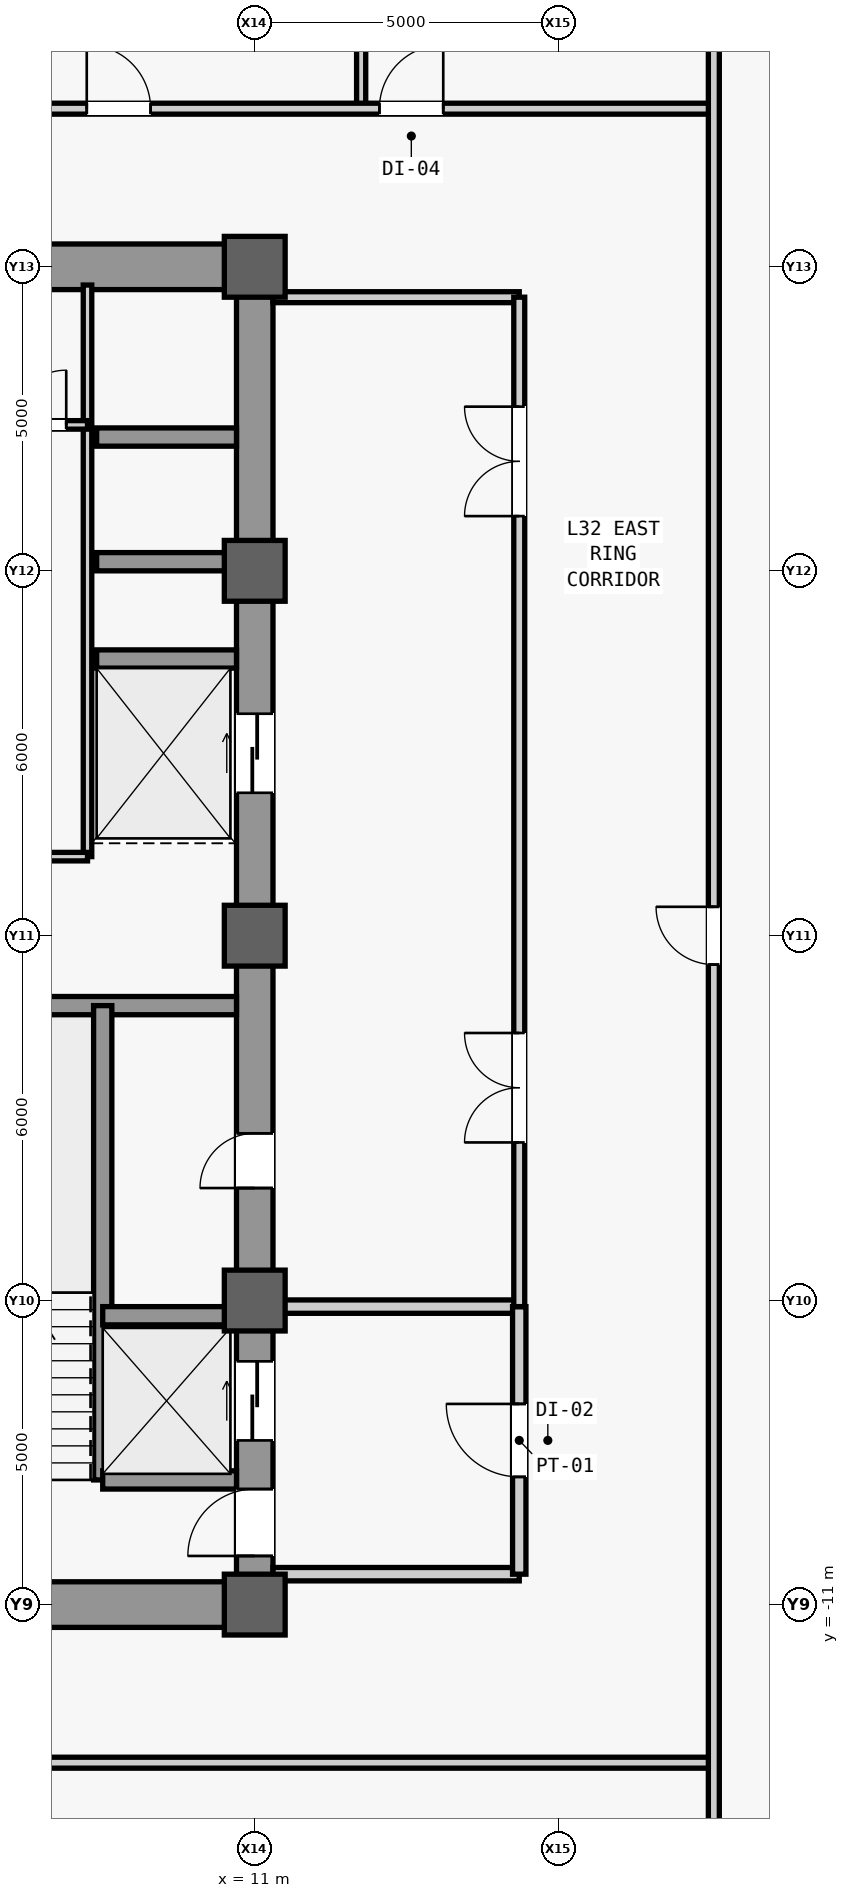
"""IFC4 building model, lengths in metres.
Left out: names, types, materials, properties, quantities, classifications, styles, units other than length and angle.
Written with IfcOpenShell. Run it as: python <this file> out.ifc"""

import sys

from ifc_helpers import new_model, si_unit, direction, frame, frame_2d, origin, origin_2d, place, context, subcontext, project, spatial, rectangle, extrude, source, transform, mapped, element, fill, save


model = new_model("IFC4")
c1 = context("Model", 3, precision=1e-05, world=origin(), true_north=direction((0.0, 1.0)))
c2 = subcontext(c1, "Body", "Model", "MODEL_VIEW")
j1 = project(units=[si_unit("LENGTHUNIT", "METRE"), si_unit("PLANEANGLEUNIT", "RADIAN")], contexts=[c1])
p1 = place(None, origin())
s1 = spatial("IfcSite", under=j1, at=p1, CompositionType="ELEMENT")
p2 = place(p1, origin())
s2 = spatial("IfcBuilding", under=s1, at=p2, CompositionType="ELEMENT")
p3 = place(p2, frame((0.0, 0.0, 140.6)))
s3 = spatial("IfcBuildingStorey", under=s2, at=p3, CompositionType="ELEMENT", Elevation=140.6)
m1 = source(origin(), c2, "Body", "SweptSolid", [
    extrude(rectangle(XDim=22.0, YDim=0.6, at=frame_2d((11.0, 0.0))), origin(), (0.0, 0.0, 1.0), 3.84),
])
p4 = place(p3, frame((11.0, -11.0, 0.0), z_axis=(0.0, 0.0, 1.0), x_axis=(0.0, 1.0, 0.0)))
e1 = element("IfcWall", 1, at=p4, inside=s3, PredefinedType="SHEAR", context=c2, shape_type="MappedRepresentation", body=[
    mapped(m1, transform((0.0, 0.0, 0.0), scale=1.0)),
])
m2 = source(origin(), c2, "Body", "SweptSolid", [
    extrude(rectangle(XDim=1.1, YDim=2.2, at=frame_2d((0.55, 1.1))), frame((0.0, 0.31, 0.0), z_axis=(0.0, -1.0, 0.0), x_axis=(1.0, 0.0, 0.0)), (0.0, 0.0, 1.0), 0.62),
])
p5 = place(p4, frame((0.8, 0.0, 0.0)))
e2 = element("IfcOpeningElement", 2, at=p5, cuts=e1, PredefinedType="OPENING", context=c2, shape_type="MappedRepresentation", body=[
    mapped(m2, transform((0.0, 0.0, 0.0), scale=1.0)),
])
m3 = source(origin(), c2, "Body", "SweptSolid", [
    extrude(rectangle(XDim=0.9, YDim=2.15, at=frame_2d((0.45, 1.075))), frame((0.0, 0.31, 0.0), z_axis=(0.0, -1.0, 0.0), x_axis=(1.0, 0.0, 0.0)), (0.0, 0.0, 1.0), 0.62),
])
p6 = place(p4, frame((6.85, 0.0, 0.0)))
e3 = element("IfcOpeningElement", 3, at=p6, cuts=e1, PredefinedType="OPENING", context=c2, shape_type="MappedRepresentation", body=[
    mapped(m3, transform((0.0, 0.0, 0.0), scale=1.0)),
])
m4 = source(origin(), c2, "Body", "SweptSolid", [
    extrude(rectangle(XDim=1.3, YDim=2.3, at=frame_2d((0.65, 1.15))), frame((0.0, 0.31, 0.0), z_axis=(0.0, -1.0, 0.0), x_axis=(1.0, 0.0, 0.0)), (0.0, 0.0, 1.0), 0.62),
])
p7 = place(p4, frame((2.7, 0.0, 0.0)))
e4 = element("IfcOpeningElement", 4, at=p7, cuts=e1, PredefinedType="OPENING", context=c2, shape_type="MappedRepresentation", body=[
    mapped(m4, transform((0.0, 0.0, 0.0), scale=1.0)),
])
p8 = place(p4, frame((13.35, 0.0, 0.0)))
e5 = element("IfcOpeningElement", 5, at=p8, cuts=e1, PredefinedType="OPENING", context=c2, shape_type="MappedRepresentation", body=[
    mapped(m4, transform((0.0, 0.0, 0.0), scale=1.0)),
])
m5 = source(origin(), c2, "Body", "SweptSolid", [
    extrude(rectangle(XDim=5.85, YDim=0.75, at=frame_2d((2.925, 0.0))), origin(), (0.0, 0.0, 1.0), 3.84),
])
p9 = place(p3, frame((4.85, -11.0, 0.0), z_axis=(0.0, 0.0, 1.0), x_axis=(1.0, 0.0, 0.0)))
e6 = element("IfcWall", 6, at=p9, inside=s3, PredefinedType="SHEAR", context=c2, shape_type="MappedRepresentation", body=[
    mapped(m5, transform((0.0, 0.0, 0.0), scale=1.0)),
])
p10 = place(p3, frame((4.85, 11.0, 0.0), z_axis=(0.0, 0.0, 1.0), x_axis=(1.0, 0.0, 0.0)))
e7 = element("IfcWall", 7, at=p10, inside=s3, PredefinedType="SHEAR", context=c2, shape_type="MappedRepresentation", body=[
    mapped(m5, transform((0.0, 0.0, 0.0), scale=1.0)),
])
m6 = source(origin(), c2, "Body", "SweptSolid", [
    extrude(rectangle(XDim=1.05, YDim=2.2, at=frame_2d((0.525, 1.1))), frame((0.0, 0.385, 0.0), z_axis=(0.0, -1.0, 0.0), x_axis=(1.0, 0.0, 0.0)), (0.0, 0.0, 1.0), 0.77),
])
p11 = place(p10, frame((1.375, 0.0, 0.0)))
e8 = element("IfcOpeningElement", 8, at=p11, cuts=e7, PredefinedType="OPENING", context=c2, shape_type="MappedRepresentation", body=[
    mapped(m6, transform((0.0, 0.0, 0.0), scale=1.0)),
])
m7 = source(origin(), c2, "Body", "SweptSolid", [
    extrude(rectangle(XDim=5.6, YDim=0.3, at=frame_2d((2.8, 0.0))), origin(), (0.0, 0.0, 1.0), 3.84),
])
p12 = place(p3, frame((5.1, -1.15, 0.0), z_axis=(0.0, 0.0, 1.0), x_axis=(1.0, 0.0, 0.0)))
e9 = element("IfcWall", 9, at=p12, inside=s3, PredefinedType="SHEAR", context=c2, shape_type="MappedRepresentation", body=[
    mapped(m7, transform((0.0, 0.0, 0.0), scale=1.0)),
])
m8 = source(origin(), c2, "Body", "SweptSolid", [
    extrude(rectangle(XDim=1.0, YDim=1.0, at=origin_2d()), origin(), (0.0, 0.0, 1.0), 4.1),
])
for number, where, z_axis, x_axis in (
    (10, (11.0, -11.0, 0.0), (0.0, 0.0, 1.0), (1.0, 0.0, 0.0)),
    (11, (11.0, -6.0, 0.0), (0.0, 0.0, 1.0), (1.0, 0.0, 0.0)),
    (12, (11.0, 0.0, 0.0), (0.0, 0.0, 1.0), (1.0, 0.0, 0.0)),
    (13, (11.0, 6.0, 0.0), (0.0, 0.0, 1.0), (1.0, 0.0, 0.0)),
    (14, (11.0, 11.0, 0.0), (0.0, 0.0, 1.0), (1.0, 0.0, 0.0)),
):
    element("IfcColumn", number, at=place(p3, frame(where, z_axis=z_axis, x_axis=x_axis)), inside=s3, PredefinedType="COLUMN", context=c2, shape_type="MappedRepresentation", body=[
        mapped(m8, transform((0.0, 0.0, 0.0), scale=1.0)),
    ])
m9 = source(origin(), c2, "Body", "SweptSolid", [
    extrude(rectangle(XDim=7.8, YDim=0.3, at=frame_2d((3.9, 0.0))), origin(), (0.0, 0.0, 1.0), 3.84),
])
p13 = place(p3, frame((8.5, -8.95, 0.0), z_axis=(0.0, 0.0, 1.0), x_axis=(0.0, 1.0, 0.0)))
e15 = element("IfcWall", 15, at=p13, inside=s3, PredefinedType="SHEAR", context=c2, shape_type="MappedRepresentation", body=[
    mapped(m9, transform((0.0, 0.0, 0.0), scale=1.0)),
])
m10 = source(origin(), c2, "Body", "SweptSolid", [
    extrude(rectangle(XDim=2.2, YDim=0.3, at=frame_2d((1.1, 0.0))), origin(), (0.0, 0.0, 1.0), 3.84),
])
for number, where, z_axis, x_axis in (
    (16, (8.5, -8.95, 0.0), (0.0, 0.0, 1.0), (1.0, 0.0, 0.0)),
    (17, (8.5, -6.25, 0.0), (0.0, 0.0, 1.0), (1.0, 0.0, 0.0)),
):
    element("IfcWall", number, at=place(p3, frame(where, z_axis=z_axis, x_axis=x_axis)), inside=s3, PredefinedType="SHEAR", context=c2, shape_type="MappedRepresentation", body=[
        mapped(m10, transform((0.0, 0.0, 0.0), scale=1.0)),
    ])
m11 = source(origin(), c2, "Body", "SweptSolid", [
    extrude(rectangle(XDim=2.3, YDim=0.3, at=frame_2d((1.15, 0.0))), origin(), (0.0, 0.0, 1.0), 3.84),
])
for number, where, z_axis, x_axis in (
    (18, (8.4, 4.55, 0.0), (0.0, 0.0, 1.0), (1.0, 0.0, 0.0)),
    (19, (8.4, 6.15, 0.0), (0.0, 0.0, 1.0), (1.0, 0.0, 0.0)),
    (20, (8.4, 8.2, 0.0), (0.0, 0.0, 1.0), (1.0, 0.0, 0.0)),
):
    element("IfcWall", number, at=place(p3, frame(where, z_axis=z_axis, x_axis=x_axis)), inside=s3, PredefinedType="SHEAR", context=c2, shape_type="MappedRepresentation", body=[
        mapped(m11, transform((0.0, 0.0, 0.0), scale=1.0)),
    ])
m12 = source(origin(), c2, "Body", "SweptSolid", [
    extrude(rectangle(XDim=9.4, YDim=0.14, at=frame_2d((4.7, 0.0))), origin(), (0.0, 0.0, 1.0), 3.84),
])
p14 = place(p3, frame((8.25, 1.3, 0.0), z_axis=(0.0, 0.0, 1.0), x_axis=(0.0, 1.0, 0.0)))
e21 = element("IfcWall", 21, at=p14, inside=s3, PredefinedType="PARTITIONING", context=c2, shape_type="MappedRepresentation", body=[
    mapped(m12, transform((0.0, 0.0, 0.0), scale=1.0)),
])
m13 = source(origin(), c2, "Body", "SweptSolid", [
    extrude(rectangle(XDim=3.15, YDim=0.14, at=frame_2d((1.575, 0.0))), origin(), (0.0, 0.0, 1.0), 3.84),
])
p15 = place(p3, frame((5.1, 1.3, 0.0), z_axis=(0.0, 0.0, 1.0), x_axis=(1.0, 0.0, 0.0)))
e22 = element("IfcWall", 22, at=p15, inside=s3, PredefinedType="PARTITIONING", context=c2, shape_type="MappedRepresentation", body=[
    mapped(m13, transform((0.0, 0.0, 0.0), scale=1.0)),
])
p16 = place(p3, frame((5.1, 8.4, 0.0), z_axis=(0.0, 0.0, 1.0), x_axis=(1.0, 0.0, 0.0)))
e23 = element("IfcWall", 23, at=p16, inside=s3, PredefinedType="PARTITIONING", context=c2, shape_type="MappedRepresentation", body=[
    mapped(m13, transform((0.0, 0.0, 0.0), scale=1.0)),
])
m14 = source(origin(), c2, "Body", "SweptSolid", [
    extrude(rectangle(XDim=0.9, YDim=2.15, at=frame_2d((0.45, 1.075))), frame((0.0, 0.08, 0.0), z_axis=(0.0, -1.0, 0.0), x_axis=(1.0, 0.0, 0.0)), (0.0, 0.0, 1.0), 0.16),
])
p17 = place(p16, frame((0.33, 0.0, 0.0)))
e24 = element("IfcOpeningElement", 24, at=p17, cuts=e23, PredefinedType="OPENING", context=c2, shape_type="MappedRepresentation", body=[
    mapped(m14, transform((0.0, 0.0, 0.0), scale=1.0)),
])
p18 = place(p16, frame((1.9, 0.0, 0.0)))
e25 = element("IfcOpeningElement", 25, at=p18, cuts=e23, PredefinedType="OPENING", context=c2, shape_type="MappedRepresentation", body=[
    mapped(m14, transform((0.0, 0.0, 0.0), scale=1.0)),
])
m15 = source(origin(), c2, "Body", "SweptSolid", [
    extrude(rectangle(XDim=4.05, YDim=0.22, at=frame_2d((2.025, 0.0))), origin(), (0.0, 0.0, 1.0), 3.84),
])
p19 = place(p3, frame((11.3, -10.5, 0.0), z_axis=(0.0, 0.0, 1.0), x_axis=(1.0, 0.0, 0.0)))
e26 = element("IfcWall", 26, at=p19, inside=s3, PredefinedType="PARTITIONING", context=c2, shape_type="MappedRepresentation", body=[
    mapped(m15, transform((0.0, 0.0, 0.0), scale=1.0)),
])
m16 = source(origin(), c2, "Body", "SweptSolid", [
    extrude(rectangle(XDim=4.05, YDim=0.22, at=frame_2d((2.025, 0.0))), origin(), (0.0, 0.0, 1.0), 3.067),
])
p20 = place(p3, frame((11.3, -6.1, 0.0), z_axis=(0.0, 0.0, 1.0), x_axis=(1.0, 0.0, 0.0)))
e27 = element("IfcWall", 27, at=p20, inside=s3, PredefinedType="PARTITIONING", context=c2, shape_type="MappedRepresentation", body=[
    mapped(m16, transform((0.0, 0.0, 0.0), scale=1.0)),
])
m17 = source(origin(), c2, "Body", "SweptSolid", [
    extrude(rectangle(XDim=4.4, YDim=0.22, at=frame_2d((2.2, 0.0))), origin(), (0.0, 0.0, 1.0), 3.84),
])
p21 = place(p3, frame((15.35, -10.5, 0.0), z_axis=(0.0, 0.0, 1.0), x_axis=(0.0, 1.0, 0.0)))
e28 = element("IfcWall", 28, at=p21, inside=s3, PredefinedType="PARTITIONING", context=c2, shape_type="MappedRepresentation", body=[
    mapped(m17, transform((0.0, 0.0, 0.0), scale=1.0)),
])
m18 = source(origin(), c2, "Body", "SweptSolid", [
    extrude(rectangle(XDim=1.2, YDim=2.2, at=frame_2d((0.6, 1.1))), frame((0.0, 0.12, 0.0), z_axis=(0.0, -1.0, 0.0), x_axis=(1.0, 0.0, 0.0)), (0.0, 0.0, 1.0), 0.24),
])
p22 = place(p21, frame((1.6, 0.0, 0.0)))
e29 = element("IfcOpeningElement", 29, at=p22, cuts=e28, PredefinedType="OPENING", context=c2, shape_type="MappedRepresentation", body=[
    mapped(m18, transform((0.0, 0.0, 0.0), scale=1.0)),
])
m19 = source(origin(), c2, "Body", "SweptSolid", [
    extrude(rectangle(XDim=4.05, YDim=0.18, at=frame_2d((2.025, 0.0))), origin(), (0.0, 0.0, 1.0), 3.84),
])
p23 = place(p3, frame((11.3, 10.5, 0.0), z_axis=(0.0, 0.0, 1.0), x_axis=(1.0, 0.0, 0.0)))
e30 = element("IfcWall", 30, at=p23, inside=s3, PredefinedType="PARTITIONING", context=c2, shape_type="MappedRepresentation", body=[
    mapped(m19, transform((0.0, 0.0, 0.0), scale=1.0)),
])
m20 = source(origin(), c2, "Body", "SweptSolid", [
    extrude(rectangle(XDim=16.6, YDim=0.18, at=frame_2d((8.3, 0.0))), origin(), (0.0, 0.0, 1.0), 3.84),
])
p24 = place(p3, frame((15.35, -6.1, 0.0), z_axis=(0.0, 0.0, 1.0), x_axis=(0.0, 1.0, 0.0)))
e31 = element("IfcWall", 31, at=p24, inside=s3, PredefinedType="PARTITIONING", context=c2, shape_type="MappedRepresentation", body=[
    mapped(m20, transform((0.0, 0.0, 0.0), scale=1.0)),
])
m21 = source(origin(), c2, "Body", "SweptSolid", [
    extrude(rectangle(XDim=1.8, YDim=2.25, at=frame_2d((0.9, 1.125))), frame((0.0, 0.1, 0.0), z_axis=(0.0, -1.0, 0.0), x_axis=(1.0, 0.0, 0.0)), (0.0, 0.0, 1.0), 0.2),
])
p25 = place(p24, frame((2.7, 0.0, 0.0)))
e32 = element("IfcOpeningElement", 32, at=p25, cuts=e31, PredefinedType="OPENING", context=c2, shape_type="MappedRepresentation", body=[
    mapped(m21, transform((0.0, 0.0, 0.0), scale=1.0)),
])
p26 = place(p24, frame((13.0, 0.0, 0.0)))
e33 = element("IfcOpeningElement", 33, at=p26, cuts=e31, PredefinedType="OPENING", context=c2, shape_type="MappedRepresentation", body=[
    mapped(m21, transform((0.0, 0.0, 0.0), scale=1.0)),
])
m22 = source(origin(), c2, "Body", "SweptSolid", [
    extrude(rectangle(XDim=36.25, YDim=0.18, at=frame_2d((18.125, 0.0))), origin(), (0.0, 0.0, 1.0), 3.84),
])
p27 = place(p3, frame((-17.7, -13.6, 0.0), z_axis=(0.0, 0.0, 1.0), x_axis=(1.0, 0.0, 0.0)))
e34 = element("IfcWall", 34, at=p27, inside=s3, PredefinedType="PARTITIONING", context=c2, shape_type="MappedRepresentation", body=[
    mapped(m22, transform((0.0, 0.0, 0.0), scale=1.0)),
])
m23 = source(origin(), c2, "Body", "SweptSolid", [
    extrude(rectangle(XDim=1.05, YDim=2.2, at=frame_2d((0.525, 1.1))), frame((0.0, 0.1, 0.0), z_axis=(0.0, -1.0, 0.0), x_axis=(1.0, 0.0, 0.0)), (0.0, 0.0, 1.0), 0.2),
])
p28 = place(p27, frame((9.1, 0.0, 0.0)))
e35 = element("IfcOpeningElement", 35, at=p28, cuts=e34, PredefinedType="OPENING", context=c2, shape_type="MappedRepresentation", body=[
    mapped(m23, transform((0.0, 0.0, 0.0), scale=1.0)),
])
p29 = place(p27, frame((23.5, 0.0, 0.0)))
e36 = element("IfcOpeningElement", 36, at=p29, cuts=e34, PredefinedType="OPENING", context=c2, shape_type="MappedRepresentation", body=[
    mapped(m23, transform((0.0, 0.0, 0.0), scale=1.0)),
])
m24 = source(origin(), c2, "Body", "SweptSolid", [
    extrude(rectangle(XDim=18.4, YDim=0.15, at=frame_2d((9.2, 0.0))), origin(), (0.0, 0.0, 1.0), 3.84),
])
p30 = place(p3, frame((12.75, 13.6, 0.0), z_axis=(0.0, 0.0, 1.0), x_axis=(0.0, 1.0, 0.0)))
e37 = element("IfcWall", 37, at=p30, inside=s3, PredefinedType="PARTITIONING", context=c2, shape_type="MappedRepresentation", body=[
    mapped(m24, transform((0.0, 0.0, 0.0), scale=1.0)),
])
p31 = place(p3, frame((-17.7, 13.6, 0.0), z_axis=(0.0, 0.0, 1.0), x_axis=(1.0, 0.0, 0.0)))
e38 = element("IfcWall", 38, at=p31, inside=s3, PredefinedType="PARTITIONING", context=c2, shape_type="MappedRepresentation", body=[
    mapped(m22, transform((0.0, 0.0, 0.0), scale=1.0)),
])
p32 = place(p31, frame((4.387, 0.0, 0.0)))
e39 = element("IfcOpeningElement", 39, at=p32, cuts=e38, PredefinedType="OPENING", context=c2, shape_type="MappedRepresentation", body=[
    mapped(m23, transform((0.0, 0.0, 0.0), scale=1.0)),
])
p33 = place(p31, frame((9.625, 0.0, 0.0)))
e40 = element("IfcOpeningElement", 40, at=p33, cuts=e38, PredefinedType="OPENING", context=c2, shape_type="MappedRepresentation", body=[
    mapped(m23, transform((0.0, 0.0, 0.0), scale=1.0)),
])
p34 = place(p31, frame((17.6, 0.0, 0.0)))
e41 = element("IfcOpeningElement", 41, at=p34, cuts=e38, PredefinedType="OPENING", context=c2, shape_type="MappedRepresentation", body=[
    mapped(m23, transform((0.0, 0.0, 0.0), scale=1.0)),
])
p35 = place(p31, frame((25.938, 0.0, 0.0)))
e42 = element("IfcOpeningElement", 42, at=p35, cuts=e38, PredefinedType="OPENING", context=c2, shape_type="MappedRepresentation", body=[
    mapped(m23, transform((0.0, 0.0, 0.0), scale=1.0)),
])
p36 = place(p31, frame((30.75, 0.0, 0.0)))
e43 = element("IfcOpeningElement", 43, at=p36, cuts=e38, PredefinedType="OPENING", context=c2, shape_type="MappedRepresentation", body=[
    mapped(m23, transform((0.0, 0.0, 0.0), scale=1.0)),
])
m25 = source(origin(), c2, "Body", "SweptSolid", [
    extrude(rectangle(XDim=56.0, YDim=0.18, at=frame_2d((28.0, 0.0))), origin(), (0.0, 0.0, 1.0), 3.84),
])
p37 = place(p3, frame((18.55, -28.0, 0.0), z_axis=(0.0, 0.0, 1.0), x_axis=(0.0, 1.0, 0.0)))
e44 = element("IfcWall", 44, at=p37, inside=s3, PredefinedType="PARTITIONING", context=c2, shape_type="MappedRepresentation", body=[
    mapped(m25, transform((0.0, 0.0, 0.0), scale=1.0)),
])
m26 = source(origin(), c2, "Body", "SweptSolid", [
    extrude(rectangle(XDim=0.95, YDim=2.15, at=frame_2d((0.475, 1.075))), frame((0.0, 0.1, 0.0), z_axis=(0.0, -1.0, 0.0), x_axis=(1.0, 0.0, 0.0)), (0.0, 0.0, 1.0), 0.2),
])
p38 = place(p37, frame((27.525, 0.0, 0.0)))
e45 = element("IfcOpeningElement", 45, at=p38, cuts=e44, PredefinedType="OPENING", context=c2, shape_type="MappedRepresentation", body=[
    mapped(m26, transform((0.0, 0.0, 0.0), scale=1.0)),
])
m27 = source(origin(), c2, "Body", "SweptSolid", [
    extrude(rectangle(XDim=1.1, YDim=2.2, at=frame_2d((0.55, 1.1))), frame((0.0, 0.025, 0.0), z_axis=(0.0, -1.0, 0.0), x_axis=(1.0, 0.0, 0.0)), (0.0, 0.0, 1.0), 0.05),
])
p39 = place(p5, origin())
e46 = element("IfcDoor", 46, at=p39, inside=s3, OperationType="SINGLE_SWING_LEFT", PredefinedType="DOOR", context=c2, shape_type="MappedRepresentation", body=[
    mapped(m27, transform((0.0, 0.0, 0.0), scale=1.0)),
])
fill(e2, e46)
m28 = source(origin(), c2, "Body", "SweptSolid", [
    extrude(rectangle(XDim=0.9, YDim=2.15, at=frame_2d((0.45, 1.075))), frame((0.0, 0.025, 0.0), z_axis=(0.0, -1.0, 0.0), x_axis=(1.0, 0.0, 0.0)), (0.0, 0.0, 1.0), 0.05),
])
p40 = place(p6, origin())
e47 = element("IfcDoor", 47, at=p40, inside=s3, OperationType="SINGLE_SWING_LEFT", PredefinedType="DOOR", context=c2, shape_type="MappedRepresentation", body=[
    mapped(m28, transform((0.0, 0.0, 0.0), scale=1.0)),
])
fill(e3, e47)
p41 = place(p18, origin())
e48 = element("IfcDoor", 48, at=p41, inside=s3, OperationType="SINGLE_SWING_RIGHT", PredefinedType="DOOR", context=c2, shape_type="MappedRepresentation", body=[
    mapped(m28, transform((0.0, 0.0, 0.0), scale=1.0)),
])
fill(e25, e48)
m29 = source(origin(), c2, "Body", "SweptSolid", [
    extrude(rectangle(XDim=1.2, YDim=2.2, at=frame_2d((0.6, 1.1))), frame((0.0, 0.025, 0.0), z_axis=(0.0, -1.0, 0.0), x_axis=(1.0, 0.0, 0.0)), (0.0, 0.0, 1.0), 0.05),
])
p42 = place(p22, origin())
e49 = element("IfcDoor", 49, at=p42, inside=s3, OperationType="SINGLE_SWING_RIGHT", PredefinedType="DOOR", context=c2, shape_type="MappedRepresentation", body=[
    mapped(m29, transform((0.0, 0.0, 0.0), scale=1.0)),
])
fill(e29, e49)
m30 = source(origin(), c2, "Body", "SweptSolid", [
    extrude(rectangle(XDim=1.8, YDim=2.25, at=frame_2d((0.9, 1.125))), frame((0.0, 0.025, 0.0), z_axis=(0.0, -1.0, 0.0), x_axis=(1.0, 0.0, 0.0)), (0.0, 0.0, 1.0), 0.05),
])
p43 = place(p25, origin())
e50 = element("IfcDoor", 50, at=p43, inside=s3, OperationType="SINGLE_SWING_RIGHT", PredefinedType="DOOR", context=c2, shape_type="MappedRepresentation", body=[
    mapped(m30, transform((0.0, 0.0, 0.0), scale=1.0)),
])
fill(e32, e50)
p44 = place(p26, origin())
e51 = element("IfcDoor", 51, at=p44, inside=s3, OperationType="SINGLE_SWING_LEFT", PredefinedType="DOOR", context=c2, shape_type="MappedRepresentation", body=[
    mapped(m30, transform((0.0, 0.0, 0.0), scale=1.0)),
])
fill(e33, e51)
m31 = source(origin(), c2, "Body", "SweptSolid", [
    extrude(rectangle(XDim=1.05, YDim=2.2, at=frame_2d((0.525, 1.1))), frame((0.0, 0.025, 0.0), z_axis=(0.0, -1.0, 0.0), x_axis=(1.0, 0.0, 0.0)), (0.0, 0.0, 1.0), 0.05),
])
p45 = place(p35, origin())
e52 = element("IfcDoor", 52, at=p45, inside=s3, OperationType="SINGLE_SWING_LEFT", PredefinedType="DOOR", context=c2, shape_type="MappedRepresentation", body=[
    mapped(m31, transform((0.0, 0.0, 0.0), scale=1.0)),
])
fill(e42, e52)
p46 = place(p36, origin())
e53 = element("IfcDoor", 53, at=p46, inside=s3, OperationType="SINGLE_SWING_RIGHT", PredefinedType="DOOR", context=c2, shape_type="MappedRepresentation", body=[
    mapped(m31, transform((0.0, 0.0, 0.0), scale=1.0)),
])
fill(e43, e53)
m32 = source(origin(), c2, "Body", "SweptSolid", [
    extrude(rectangle(XDim=0.95, YDim=2.15, at=frame_2d((0.475, 1.075))), frame((0.0, 0.025, 0.0), z_axis=(0.0, -1.0, 0.0), x_axis=(1.0, 0.0, 0.0)), (0.0, 0.0, 1.0), 0.05),
])
p47 = place(p38, origin())
e54 = element("IfcDoor", 54, at=p47, inside=s3, OperationType="SINGLE_SWING_RIGHT", PredefinedType="DOOR", context=c2, shape_type="MappedRepresentation", body=[
    mapped(m32, transform((0.0, 0.0, 0.0), scale=1.0)),
])
fill(e45, e54)
m33 = source(origin(), c2, "Body", "SweptSolid", [
    extrude(rectangle(XDim=1.3, YDim=2.3, at=frame_2d((0.65, 1.15))), frame((0.0, 0.025, 0.0), z_axis=(0.0, -1.0, 0.0), x_axis=(1.0, 0.0, 0.0)), (0.0, 0.0, 1.0), 0.05),
])
p48 = place(p7, origin())
e55 = element("IfcDoor", 55, at=p48, inside=s3, OperationType="SLIDING_TO_LEFT", PredefinedType="DOOR", context=c2, shape_type="MappedRepresentation", body=[
    mapped(m33, transform((0.0, 0.0, 0.0), scale=1.0)),
])
fill(e4, e55)
p49 = place(p8, origin())
e56 = element("IfcDoor", 56, at=p49, inside=s3, OperationType="SLIDING_TO_LEFT", PredefinedType="DOOR", context=c2, shape_type="MappedRepresentation", body=[
    mapped(m33, transform((0.0, 0.0, 0.0), scale=1.0)),
])
fill(e5, e56)
save(model, sys.argv[1])
